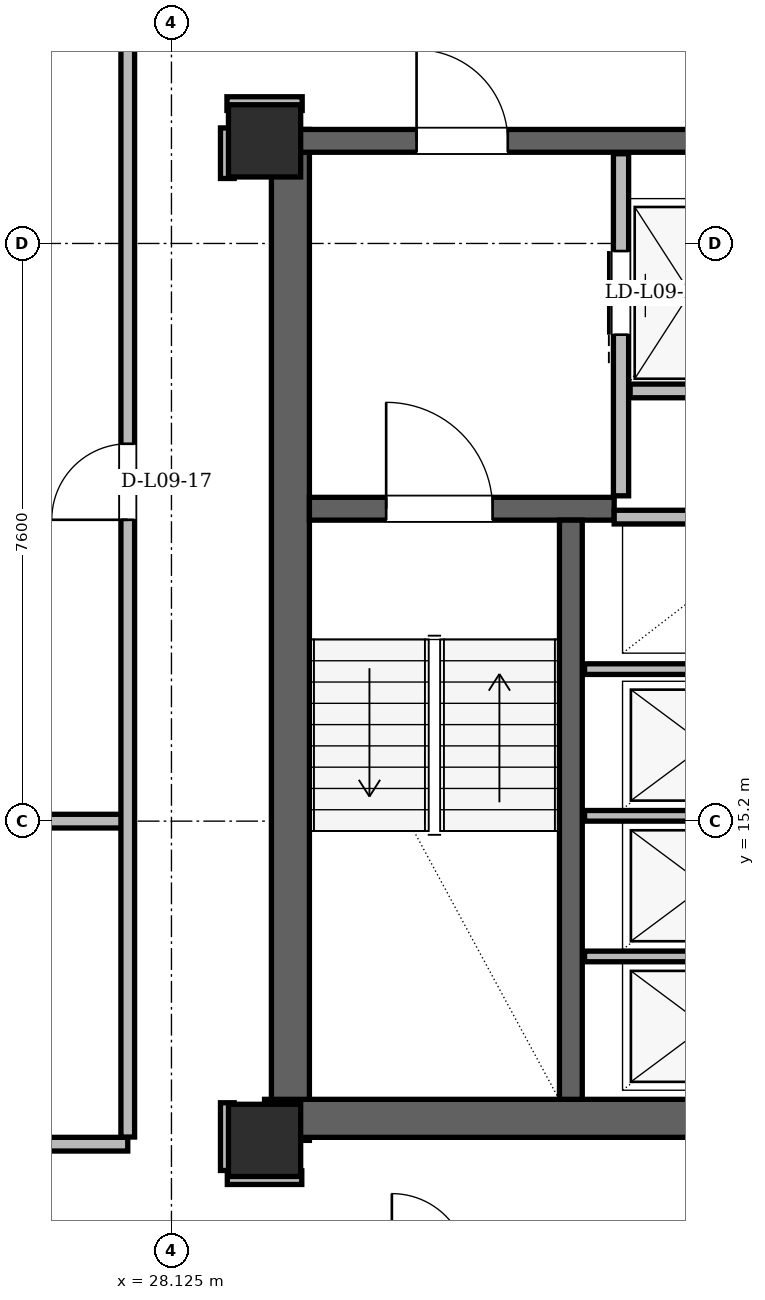
"""IFC4 building model, lengths in metres.
Left out: names, types, materials, properties, quantities, classifications, styles, units other than length and angle.
Written with IfcOpenShell. Run it as: python <this file> out.ifc"""

import sys

from ifc_helpers import new_model, si_unit, direction, frame, frame_2d, origin, origin_2d, place, context, subcontext, project, spatial, rectangle, hollow_rectangle, extrude, element, fill, save


model = new_model("IFC4")
c1 = context("Model", 3, precision=1e-05, world=origin(), true_north=direction((0.0, 1.0)))
c2 = subcontext(c1, "Body", "Model", "MODEL_VIEW")
j1 = project(units=[si_unit("LENGTHUNIT", "METRE"), si_unit("PLANEANGLEUNIT", "RADIAN")], contexts=[c1])
p1 = place(None, origin())
s1 = spatial("IfcSite", under=j1, at=p1, CompositionType="ELEMENT")
p2 = place(p1, origin())
s2 = spatial("IfcBuilding", under=s1, at=p2, CompositionType="ELEMENT")
p3 = place(p2, frame((0.0, 0.0, 38.1)))
s3 = spatial("IfcBuildingStorey", under=s2, at=p3, CompositionType="ELEMENT", Elevation=38.1)
for number, where, z_axis, x_axis in (
    (1, (29.35, 11.0, 0.0), (0.0, 0.0, 1.0), (1.0, 0.0, 0.0)),
    (2, (29.35, 24.15, 0.0), (0.0, 0.0, 1.0), (1.0, 0.0, 0.0)),
):
    element("IfcColumn", number, at=place(p3, frame(where, z_axis=z_axis, x_axis=x_axis)), inside=s3, PredefinedType="COLUMN", context=c2, shape_type="SweptSolid", body=[
        extrude(hollow_rectangle(XDim=0.95, YDim=0.95, WallThickness=0.08, at=origin_2d()), origin(), (0.0, 0.0, 1.0), 3.6),
    ])
p4 = place(p3, frame((29.69, 11.0, 0.0), z_axis=(0.0, 0.0, 1.0), x_axis=(0.0, 1.0, 0.0)))
e3 = element("IfcWall", 3, at=p4, inside=s3, PredefinedType="SHEAR", context=c2, shape_type="SweptSolid", body=[
    extrude(rectangle(XDim=13.3, YDim=0.5, at=frame_2d((6.65, 0.0))), origin(), (0.0, 0.0, 1.0), 3.36),
])
p5 = place(p3, frame((29.35, 11.29, 0.0), z_axis=(0.0, 0.0, 1.0), x_axis=(1.0, 0.0, 0.0)))
e4 = element("IfcWall", 4, at=p5, inside=s3, PredefinedType="SHEAR", context=c2, shape_type="SweptSolid", body=[
    extrude(rectangle(XDim=7.1, YDim=0.5, at=frame_2d((3.55, 0.0))), origin(), (0.0, 0.0, 1.0), 3.36),
])
p6 = place(p3, frame((29.65, 24.15, 0.0), z_axis=(0.0, 0.0, 1.0), x_axis=(1.0, 0.0, 0.0)))
e5 = element("IfcWall", 5, at=p6, inside=s3, PredefinedType="SHEAR", context=c2, shape_type="SweptSolid", body=[
    extrude(rectangle(XDim=15.7, YDim=0.3, at=frame_2d((7.85, 0.0))), origin(), (0.0, 0.0, 1.0), 3.36),
])
p7 = place(p6, frame((1.7, 0.0, 0.0)))
e6 = element("IfcOpeningElement", 6, at=p7, cuts=e5, PredefinedType="OPENING", context=c2, shape_type="SweptSolid", body=[
    extrude(rectangle(XDim=1.2, YDim=2.2, at=frame_2d((0.6, 1.1))), frame((0.0, 0.15, 0.0), z_axis=(0.0, -1.0, 0.0), x_axis=(1.0, 0.0, 0.0)), (0.0, 0.0, 1.0), 0.3),
])
p8 = place(p6, frame((12.8, 0.0, 0.0)))
e7 = element("IfcOpeningElement", 7, at=p8, cuts=e5, PredefinedType="OPENING", context=c2, shape_type="SweptSolid", body=[
    extrude(rectangle(XDim=1.2, YDim=2.2, at=frame_2d((0.6, 1.1))), frame((0.0, 0.15, 0.0), z_axis=(0.0, -1.0, 0.0), x_axis=(1.0, 0.0, 0.0)), (0.0, 0.0, 1.0), 0.3),
])
p9 = place(p6, frame((7.4, 0.0, 0.0)))
e8 = element("IfcOpeningElement", 8, at=p9, cuts=e5, PredefinedType="OPENING", context=c2, shape_type="SweptSolid", body=[
    extrude(rectangle(XDim=0.9, YDim=2.05, at=frame_2d((0.45, 1.025))), frame((0.0, 0.15, 0.0), z_axis=(0.0, -1.0, 0.0), x_axis=(1.0, 0.0, 0.0)), (0.0, 0.0, 1.0), 0.3),
])
p10 = place(p3, frame((29.94, 19.31, 0.0), z_axis=(0.0, 0.0, 1.0), x_axis=(1.0, 0.0, 0.0)))
e9 = element("IfcWall", 9, at=p10, inside=s3, PredefinedType="SHEAR", context=c2, shape_type="SweptSolid", body=[
    extrude(rectangle(XDim=4.01, YDim=0.3, at=frame_2d((2.005, 0.0))), origin(), (0.0, 0.0, 1.0), 3.36),
])
p11 = place(p10, frame((1.01, 0.0, 0.0)))
e10 = element("IfcOpeningElement", 10, at=p11, cuts=e9, PredefinedType="OPENING", context=c2, shape_type="SweptSolid", body=[
    extrude(rectangle(XDim=1.4, YDim=2.2, at=frame_2d((0.7, 1.1))), frame((0.0, 0.15, 0.0), z_axis=(0.0, -1.0, 0.0), x_axis=(1.0, 0.0, 0.0)), (0.0, 0.0, 1.0), 0.3),
])
p12 = place(p3, frame((33.38, 11.54, 0.0), z_axis=(0.0, 0.0, 1.0), x_axis=(0.0, 1.0, 0.0)))
e11 = element("IfcWall", 11, at=p12, inside=s3, PredefinedType="SHEAR", context=c2, shape_type="SweptSolid", body=[
    extrude(rectangle(XDim=7.62, YDim=0.3, at=frame_2d((3.81, 0.0))), origin(), (0.0, 0.0, 1.0), 3.36),
])
p13 = place(p3, frame((29.798, 43.612, 0.0), z_axis=(0.0, 0.0, 1.0), x_axis=(-0.499997221217, -0.86602700811, 0.0)))
e12 = element("IfcWall", 12, at=p13, inside=s3, PredefinedType="SOLIDWALL", context=c2, shape_type="SweptSolid", body=[
    extrude(rectangle(XDim=33.022, YDim=0.34, at=frame_2d((16.511, 0.0))), origin(), (0.0, 0.0, 1.0), 2.494),
])
p14 = place(p13, frame((7.404, 0.0, 0.0)))
e13 = element("IfcOpeningElement", 13, at=p14, cuts=e12, PredefinedType="OPENING", context=c2, shape_type="SweptSolid", body=[
    extrude(rectangle(XDim=1.5, YDim=2.2, at=frame_2d((0.75, 1.1))), frame((0.0, 0.17, 0.0), z_axis=(0.0, -1.0, 0.0), x_axis=(1.0, 0.0, 0.0)), (0.0, 0.0, 1.0), 0.34),
])
p15 = place(p13, frame((25.362, 0.0, 0.0)))
e14 = element("IfcOpeningElement", 14, at=p15, cuts=e12, PredefinedType="OPENING", context=c2, shape_type="SweptSolid", body=[
    extrude(rectangle(XDim=1.5, YDim=2.2, at=frame_2d((0.75, 1.1))), frame((0.0, 0.17, 0.0), z_axis=(0.0, -1.0, 0.0), x_axis=(1.0, 0.0, 0.0)), (0.0, 0.0, 1.0), 0.34),
])
p16 = place(p13, frame((15.315, 0.0, 0.85)))
e15 = element("IfcOpeningElement", 15, at=p16, cuts=e12, PredefinedType="OPENING", context=c2, shape_type="SweptSolid", body=[
    extrude(rectangle(XDim=2.0, YDim=1.534, at=frame_2d((1.0, 0.767))), frame((0.0, 0.17, 0.0), z_axis=(0.0, -1.0, 0.0), x_axis=(1.0, 0.0, 0.0)), (0.0, 0.0, 1.0), 0.34),
])
p17 = place(p13, frame((28.879, 0.0, 0.85)))
e16 = element("IfcOpeningElement", 16, at=p17, cuts=e12, PredefinedType="OPENING", context=c2, shape_type="SweptSolid", body=[
    extrude(rectangle(XDim=1.4, YDim=1.534, at=frame_2d((0.7, 0.767))), frame((0.0, 0.17, 0.0), z_axis=(0.0, -1.0, 0.0), x_axis=(1.0, 0.0, 0.0)), (0.0, 0.0, 1.0), 0.34),
])
p18 = place(p13, frame((10.808, 0.0, 0.85)))
e17 = element("IfcOpeningElement", 17, at=p18, cuts=e12, PredefinedType="OPENING", context=c2, shape_type="SweptSolid", body=[
    extrude(rectangle(XDim=1.2, YDim=1.48, at=frame_2d((0.6, 0.74))), frame((0.0, 0.17, 0.0), z_axis=(0.0, -1.0, 0.0), x_axis=(1.0, 0.0, 0.0)), (0.0, 0.0, 1.0), 0.34),
])
p19 = place(p3, frame((34.04, 19.48, 0.0), z_axis=(0.0, 0.0, 1.0), x_axis=(0.0, 1.0, 0.0)))
e18 = element("IfcWall", 18, at=p19, inside=s3, PredefinedType="PARTITIONING", context=c2, shape_type="SweptSolid", body=[
    extrude(rectangle(XDim=4.5, YDim=0.2, at=frame_2d((2.25, 0.0))), origin(), (0.0, 0.0, 1.0), 2.4),
])
p20 = place(p19, frame((2.12, 0.0, 0.0)))
e19 = element("IfcOpeningElement", 19, at=p20, cuts=e18, PredefinedType="OPENING", context=c2, shape_type="SweptSolid", body=[
    extrude(rectangle(XDim=1.1, YDim=2.2, at=frame_2d((0.55, 1.1))), frame((0.0, 0.1, 0.0), z_axis=(0.0, -1.0, 0.0), x_axis=(1.0, 0.0, 0.0)), (0.0, 0.0, 1.0), 0.2),
])
p21 = place(p3, frame((34.16, 20.86, 0.0), z_axis=(0.0, 0.0, 1.0), x_axis=(1.0, 0.0, 0.0)))
e20 = element("IfcWall", 20, at=p21, inside=s3, PredefinedType="PARTITIONING", context=c2, shape_type="SweptSolid", body=[
    extrude(rectangle(XDim=1.58, YDim=0.18, at=frame_2d((0.79, 0.0))), origin(), (0.0, 0.0, 1.0), 3.36),
])
p22 = place(p3, frame((33.95, 19.2, 0.0), z_axis=(0.0, 0.0, 1.0), x_axis=(1.0, 0.0, 0.0)))
e21 = element("IfcWall", 21, at=p22, inside=s3, PredefinedType="PARTITIONING", context=c2, shape_type="SweptSolid", body=[
    extrude(rectangle(XDim=2.27, YDim=0.18, at=frame_2d((1.135, 0.0))), origin(), (0.0, 0.0, 1.0), 3.36),
])
for number, where, z_axis, x_axis in (
    (22, (33.56, 13.42, 0.0), (0.0, 0.0, 1.0), (1.0, 0.0, 0.0)),
    (23, (33.56, 15.27, 0.0), (0.0, 0.0, 1.0), (1.0, 0.0, 0.0)),
    (24, (33.56, 17.2, 0.0), (0.0, 0.0, 1.0), (1.0, 0.0, 0.0)),
):
    element("IfcWall", number, at=place(p3, frame(where, z_axis=z_axis, x_axis=x_axis)), inside=s3, PredefinedType="PARTITIONING", context=c2, shape_type="SweptSolid", body=[
        extrude(rectangle(XDim=2.66, YDim=0.14, at=frame_2d((1.33, 0.0))), origin(), (0.0, 0.0, 1.0), 3.36),
    ])
p23 = place(p3, frame((28.86, 10.51, 0.0), z_axis=(0.0, 0.0, 1.0), x_axis=(1.0, 0.0, 0.0)))
e25 = element("IfcWall", 25, at=p23, inside=s3, PredefinedType="PARTITIONING", context=c2, shape_type="SweptSolid", body=[
    extrude(rectangle(XDim=0.98, YDim=0.18, at=frame_2d((0.49, 0.0))), origin(), (0.0, 0.0, 1.0), 2.738),
])
p24 = place(p3, frame((19.2, 10.95, 0.0), z_axis=(0.0, 0.0, 1.0), x_axis=(1.0, 0.0, 0.0)))
e26 = element("IfcWall", 26, at=p24, inside=s3, PredefinedType="PARTITIONING", context=c2, shape_type="SweptSolid", body=[
    extrude(rectangle(XDim=8.35, YDim=0.18, at=frame_2d((4.175, 0.0))), origin(), (0.0, 0.0, 1.0), 3.36),
])
p25 = place(p3, frame((13.734, 15.2, 0.0), z_axis=(0.0, 0.0, 1.0), x_axis=(1.0, 0.0, 0.0)))
e27 = element("IfcWall", 27, at=p25, inside=s3, PredefinedType="PARTITIONING", context=c2, shape_type="SweptSolid", body=[
    extrude(rectangle(XDim=13.816, YDim=0.18, at=frame_2d((6.908, 0.0))), origin(), (0.0, 0.0, 1.0), 2.946),
])
p26 = place(p3, frame((28.855, 24.64, 0.0), z_axis=(0.0, 0.0, 1.0), x_axis=(1.0, 0.0, 0.0)))
e28 = element("IfcWall", 28, at=p26, inside=s3, PredefinedType="PARTITIONING", context=c2, shape_type="SweptSolid", body=[
    extrude(rectangle(XDim=0.99, YDim=0.18, at=frame_2d((0.495, 0.0))), origin(), (0.0, 0.0, 1.0), 2.738),
])
p27 = place(p3, frame((27.55, 11.044, 0.0), z_axis=(0.0, 0.0, 1.0), x_axis=(0.0, 1.0, 0.0)))
e29 = element("IfcWall", 29, at=p27, inside=s3, PredefinedType="PARTITIONING", context=c2, shape_type="SweptSolid", body=[
    extrude(rectangle(XDim=28.326, YDim=0.18, at=frame_2d((14.163, 0.0))), origin(), (0.0, 0.0, 1.0), 2.494),
])
p28 = place(p27, frame((8.121, 0.0, 0.0)))
e30 = element("IfcOpeningElement", 30, at=p28, cuts=e29, PredefinedType="OPENING", context=c2, shape_type="SweptSolid", body=[
    extrude(rectangle(XDim=1.0, YDim=2.18, at=frame_2d((0.5, 1.09))), frame((0.0, 0.09, 0.0), z_axis=(0.0, -1.0, 0.0), x_axis=(1.0, 0.0, 0.0)), (0.0, 0.0, 1.0), 0.18),
])
p29 = place(p3, frame((28.86, 10.604, 0.0), z_axis=(0.0, 0.0, 1.0), x_axis=(0.0, 1.0, 0.0)))
e31 = element("IfcWall", 31, at=p29, inside=s3, PredefinedType="PARTITIONING", context=c2, shape_type="SweptSolid", body=[
    extrude(rectangle(XDim=0.891, YDim=0.18, at=frame_2d((0.446, 0.0))), origin(), (0.0, 0.0, 1.0), 2.738),
])
p30 = place(p3, frame((28.86, 23.655, 0.0), z_axis=(0.0, 0.0, 1.0), x_axis=(0.0, 1.0, 0.0)))
e32 = element("IfcWall", 32, at=p30, inside=s3, PredefinedType="PARTITIONING", context=c2, shape_type="SweptSolid", body=[
    extrude(rectangle(XDim=0.665, YDim=0.18, at=frame_2d((0.333, 0.0))), origin(), (0.0, 0.0, 1.0), 3.36),
])
p31 = place(p20, origin())
e33 = element("IfcDoor", 33, at=p31, inside=s3, OperationType="SLIDING_TO_LEFT", PredefinedType="DOOR", context=c2, shape_type="SweptSolid", body=[
    extrude(rectangle(XDim=1.1, YDim=2.2, at=frame_2d((0.55, 1.1))), frame((0.0, 0.025, 0.0), z_axis=(0.0, -1.0, 0.0), x_axis=(1.0, 0.0, 0.0)), (0.0, 0.0, 1.0), 0.05),
])
fill(e19, e33)
p32 = place(p11, origin())
e34 = element("IfcDoor", 34, at=p32, inside=s3, OperationType="SINGLE_SWING_LEFT", PredefinedType="DOOR", context=c2, shape_type="SweptSolid", body=[
    extrude(rectangle(XDim=1.4, YDim=2.2, at=frame_2d((0.7, 1.1))), frame((0.0, 0.025, 0.0), z_axis=(0.0, -1.0, 0.0), x_axis=(1.0, 0.0, 0.0)), (0.0, 0.0, 1.0), 0.05),
])
fill(e10, e34)
p33 = place(p7, origin())
e35 = element("IfcDoor", 35, at=p33, inside=s3, OperationType="SINGLE_SWING_LEFT", PredefinedType="DOOR", context=c2, shape_type="SweptSolid", body=[
    extrude(rectangle(XDim=1.2, YDim=2.2, at=frame_2d((0.6, 1.1))), frame((0.0, 0.025, 0.0), z_axis=(0.0, -1.0, 0.0), x_axis=(1.0, 0.0, 0.0)), (0.0, 0.0, 1.0), 0.05),
])
fill(e6, e35)
p34 = place(p28, origin())
e36 = element("IfcDoor", 36, at=p34, inside=s3, OperationType="SINGLE_SWING_LEFT", PredefinedType="DOOR", context=c2, shape_type="SweptSolid", body=[
    extrude(rectangle(XDim=1.0, YDim=2.18, at=frame_2d((0.5, 1.09))), frame((0.0, 0.025, 0.0), z_axis=(0.0, -1.0, 0.0), x_axis=(1.0, 0.0, 0.0)), (0.0, 0.0, 1.0), 0.05),
])
fill(e30, e36)
save(model, sys.argv[1])
